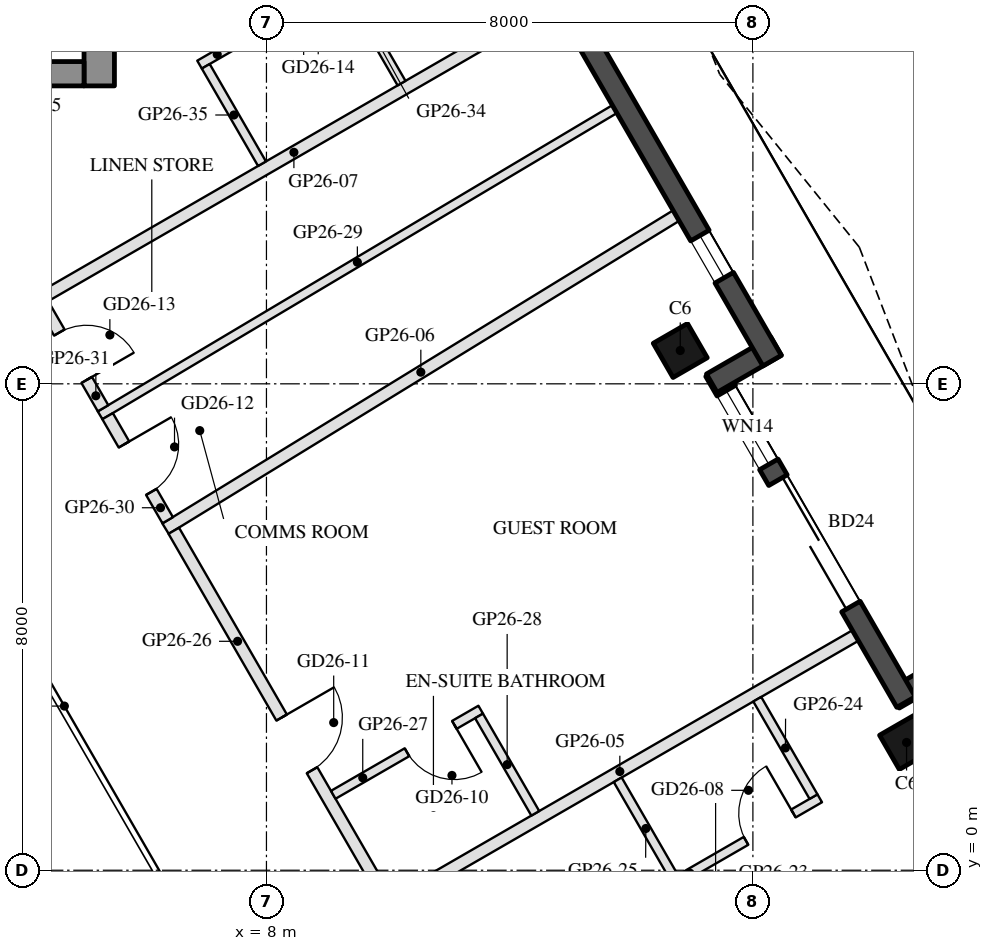
"""IFC4 building model, lengths in metres.
Left out: names, types, materials, properties, quantities, classifications, styles, units other than length and angle.
Written with IfcOpenShell. Run it as: python <this file> out.ifc"""

import sys

from ifc_helpers import new_model, si_unit, direction, frame, frame_2d, origin, origin_2d, place, context, subcontext, project, spatial, rectangle, hollow_rectangle, extrude, boolean, halfspace, element, fill, save


model = new_model("IFC4")
c1 = context("Model", 3, precision=1e-05, world=origin(), true_north=direction((0.0, 1.0)))
c2 = subcontext(c1, "Body", "Model", "MODEL_VIEW")
j1 = project(units=[si_unit("LENGTHUNIT", "METRE"), si_unit("PLANEANGLEUNIT", "RADIAN")], contexts=[c1])
p1 = place(None, origin())
s1 = spatial("IfcSite", under=j1, at=p1, CompositionType="ELEMENT")
p2 = place(p1, origin())
s2 = spatial("IfcBuilding", under=s1, at=p2, CompositionType="ELEMENT")
p3 = place(p2, frame((0.0, 0.0, 272.6)))
s3 = spatial("IfcBuildingStorey", under=s2, at=p3, CompositionType="ELEMENT", Elevation=272.6)
p4 = place(p3, frame((18.527, 2.102, 0.0), z_axis=(0.0, 0.0, 1.0), x_axis=(-0.5, 0.866025403784, 0.0)))
e1 = element("IfcColumn", 1, at=p4, inside=s3, PredefinedType="COLUMN", context=c2, shape_type="SweptSolid", body=[
    boolean("DIFFERENCE", extrude(hollow_rectangle(XDim=0.65, YDim=0.65, WallThickness=0.03, at=origin_2d()), origin(), (0.0, 0.0, 1.0), 3.7), halfspace(frame((0.0, 0.0, 3.66), z_axis=(0.0, 0.0, 1.0), x_axis=(1.0, 0.0, 0.0)), False)),
])
p5 = place(p3, frame((14.805, 8.548, 0.0), z_axis=(0.0, 0.0, 1.0), x_axis=(-0.5, 0.866025403784, 0.0)))
e2 = element("IfcColumn", 2, at=p5, inside=s3, PredefinedType="COLUMN", context=c2, shape_type="SweptSolid", body=[
    boolean("DIFFERENCE", extrude(hollow_rectangle(XDim=0.65, YDim=0.65, WallThickness=0.03, at=origin_2d()), origin(), (0.0, 0.0, 1.0), 3.7), halfspace(frame((0.0, 0.0, 3.663), z_axis=(0.0, 0.0, 1.0), x_axis=(1.0, 0.0, 0.0)), False)),
])
p6 = place(p3, frame((19.377, 3.429, 0.0), z_axis=(0.0, 0.0, 1.0), x_axis=(-0.866092288191, -0.499884134912, 0.0)))
e3 = element("IfcWall", 3, at=p6, inside=s3, PredefinedType="SOLIDWALL", context=c2, shape_type="SweptSolid", body=[
    extrude(rectangle(XDim=1.22, YDim=0.35, at=frame_2d((0.61, 0.0))), origin(), (0.0, 0.0, 1.0), 3.55),
])
p7 = place(p3, frame((18.519, 2.766, 0.0), z_axis=(0.0, 0.0, 1.0), x_axis=(-0.499995993298, 0.866027717042, 0.0)))
e4 = element("IfcWall", 4, at=p7, inside=s3, PredefinedType="SOLIDWALL", context=c2, shape_type="SweptSolid", body=[
    extrude(rectangle(XDim=6.284, YDim=0.35, at=frame_2d((3.142, 0.0))), origin(), (0.0, 0.0, 1.0), 3.55),
])
p8 = place(p7, frame((1.813, 0.0, 0.0)))
e5 = element("IfcOpeningElement", 5, at=p8, cuts=e4, PredefinedType="OPENING", context=c2, shape_type="SweptSolid", body=[
    extrude(rectangle(XDim=2.4, YDim=2.4, at=frame_2d((1.2, 1.2))), frame((0.0, 0.185, 0.0), z_axis=(0.0, -1.0, 0.0), x_axis=(1.0, 0.0, 0.0)), (0.0, 0.0, 1.0), 0.37),
])
p9 = place(p7, frame((4.513, 0.0, 0.3)))
e6 = element("IfcOpeningElement", 6, at=p9, cuts=e4, PredefinedType="OPENING", context=c2, shape_type="SweptSolid", body=[
    extrude(rectangle(XDim=1.4, YDim=2.65, at=frame_2d((0.7, 1.325))), frame((0.0, 0.185, 0.0), z_axis=(0.0, -1.0, 0.0), x_axis=(1.0, 0.0, 0.0)), (0.0, 0.0, 1.0), 0.37),
])
p10 = place(p3, frame((15.324, 8.01, 0.0), z_axis=(0.0, 0.0, 1.0), x_axis=(0.866005645448, 0.500034220881, 0.0)))
e7 = element("IfcWall", 7, at=p10, inside=s3, PredefinedType="SOLIDWALL", context=c2, shape_type="SweptSolid", body=[
    extrude(rectangle(XDim=1.22, YDim=0.35, at=frame_2d((0.61, 0.0))), origin(), (0.0, 0.0, 1.0), 3.55),
])
p11 = place(p3, frame((16.316, 8.381, 0.0), z_axis=(0.0, 0.0, 1.0), x_axis=(-0.500005190411, 0.866022407078, 0.0)))
e8 = element("IfcWall", 8, at=p11, inside=s3, PredefinedType="SOLIDWALL", context=c2, shape_type="SweptSolid", body=[
    extrude(rectangle(XDim=9.244, YDim=0.35, at=frame_2d((4.622, 0.0))), origin(), (0.0, 0.0, 1.0), 3.55),
])
p12 = place(p11, frame((1.575, 0.0, 0.3)))
e9 = element("IfcOpeningElement", 9, at=p12, cuts=e8, PredefinedType="OPENING", context=c2, shape_type="SweptSolid", body=[
    extrude(rectangle(XDim=0.8, YDim=2.65, at=frame_2d((0.4, 1.325))), frame((0.0, 0.185, 0.0), z_axis=(0.0, -1.0, 0.0), x_axis=(1.0, 0.0, 0.0)), (0.0, 0.0, 1.0), 0.37),
])
p13 = place(p3, frame((5.25, 12.9, 0.0), z_axis=(0.0, 0.0, 1.0), x_axis=(0.0, 1.0, 0.0)))
e10 = element("IfcWall", 10, at=p13, inside=s3, PredefinedType="SHEAR", context=c2, shape_type="SweptSolid", body=[
    extrude(rectangle(XDim=13.031, YDim=0.5, at=frame_2d((6.516, 0.0))), origin(), (0.0, 0.0, 1.0), 3.5),
])
p14 = place(p3, frame((5.0, 13.1, 0.0), z_axis=(0.0, 0.0, 1.0), x_axis=(-1.0, 0.0, 0.0)))
e11 = element("IfcWall", 11, at=p14, inside=s3, PredefinedType="SHEAR", context=c2, shape_type="SweptSolid", body=[
    extrude(rectangle(XDim=10.0, YDim=0.4, at=frame_2d((5.0, 0.0))), origin(), (0.0, 0.0, 1.0), 3.5),
])
p15 = place(p14, frame((3.55, 0.0, 0.0)))
e12 = element("IfcOpeningElement", 12, at=p15, cuts=e11, PredefinedType="OPENING", context=c2, shape_type="SweptSolid", body=[
    extrude(rectangle(XDim=1.1, YDim=2.1, at=frame_2d((0.55, 1.05))), frame((0.0, 0.21, 0.0), z_axis=(0.0, -1.0, 0.0), x_axis=(1.0, 0.0, 0.0)), (0.0, 0.0, 1.0), 0.42),
])
p16 = place(p14, frame((5.85, 0.0, 0.0)))
e13 = element("IfcOpeningElement", 13, at=p16, cuts=e11, PredefinedType="OPENING", context=c2, shape_type="SweptSolid", body=[
    extrude(rectangle(XDim=1.4, YDim=2.1, at=frame_2d((0.7, 1.05))), frame((0.0, 0.21, 0.0), z_axis=(0.0, -1.0, 0.0), x_axis=(1.0, 0.0, 0.0)), (0.0, 0.0, 1.0), 0.42),
])
p17 = place(p3, frame((17.685, 3.86, 0.0), z_axis=(0.0, 0.0, 1.0), x_axis=(-0.866026066645, -0.499998851889, 0.0)))
e14 = element("IfcWall", 14, at=p17, inside=s3, PredefinedType="PARTITIONING", context=c2, shape_type="SweptSolid", body=[
    extrude(rectangle(XDim=8.946, YDim=0.2, at=frame_2d((4.473, 0.0))), origin(), (0.0, 0.0, 1.0), 3.1),
])
p18 = place(p3, frame((14.737, 10.766, 0.0), z_axis=(0.0, 0.0, 1.0), x_axis=(-0.852501485732, -0.522724800277, 0.0)))
e15 = element("IfcWall", 15, at=p18, inside=s3, PredefinedType="PARTITIONING", context=c2, shape_type="SweptSolid", body=[
    extrude(rectangle(XDim=9.849, YDim=0.2, at=frame_2d((4.925, 0.0))), origin(), (0.0, 0.0, 1.0), 3.1),
])
p19 = place(p3, frame((12.715, 14.269, 0.0), z_axis=(0.0, 0.0, 1.0), x_axis=(-0.866024954444, -0.500000778279, 0.0)))
e16 = element("IfcWall", 16, at=p19, inside=s3, PredefinedType="PARTITIONING", context=c2, shape_type="SweptSolid", body=[
    extrude(rectangle(XDim=9.846, YDim=0.2, at=frame_2d((4.923, 0.0))), origin(), (0.0, 0.0, 1.0), 3.1),
])
p20 = place(p3, frame((14.674, -0.217, 0.0), z_axis=(0.0, 0.0, 1.0), x_axis=(0.866056369097, 0.49994636267, 0.0)))
e17 = element("IfcWall", 17, at=p20, inside=s3, PredefinedType="PARTITIONING", context=c2, shape_type="SweptSolid", body=[
    extrude(rectangle(XDim=2.8, YDim=0.15, at=frame_2d((1.4, 0.0))), origin(), (0.0, 0.0, 1.0), 3.0),
])
p21 = place(p20, frame((1.4, 0.0, 0.0)))
e18 = element("IfcOpeningElement", 18, at=p21, cuts=e17, PredefinedType="OPENING", context=c2, shape_type="SweptSolid", body=[
    extrude(rectangle(XDim=0.9, YDim=2.1, at=frame_2d((0.45, 1.05))), frame((0.0, 0.085, 0.0), z_axis=(0.0, -1.0, 0.0), x_axis=(1.0, 0.0, 0.0)), (0.0, 0.0, 1.0), 0.17),
])
p22 = place(p3, frame((16.997, 1.211, 0.0), z_axis=(0.0, 0.0, 1.0), x_axis=(-0.500042316284, 0.866000971088, 0.0)))
e19 = element("IfcWall", 19, at=p22, inside=s3, PredefinedType="PARTITIONING", context=c2, shape_type="SweptSolid", body=[
    extrude(rectangle(XDim=1.85, YDim=0.15, at=frame_2d((0.925, 0.0))), origin(), (0.0, 0.0, 1.0), 3.0),
])
p23 = place(p3, frame((14.702, -0.115, 0.0), z_axis=(0.0, 0.0, 1.0), x_axis=(-0.499985172903, 0.866033964044, 0.0)))
e20 = element("IfcWall", 20, at=p23, inside=s3, PredefinedType="PARTITIONING", context=c2, shape_type="SweptSolid", body=[
    extrude(rectangle(XDim=1.85, YDim=0.15, at=frame_2d((0.925, 0.0))), origin(), (0.0, 0.0, 1.0), 3.0),
])
p24 = place(p3, frame((6.476, 5.583, 0.0), z_axis=(0.0, 0.0, 1.0), x_axis=(0.499989243959, -0.866031613699, 0.0)))
e21 = element("IfcWall", 21, at=p24, inside=s3, PredefinedType="PARTITIONING", context=c2, shape_type="SweptSolid", body=[
    extrude(rectangle(XDim=6.997, YDim=0.2, at=frame_2d((3.499, 0.0))), origin(), (0.0, 0.0, 1.0), 3.0),
])
p25 = place(p24, frame((3.547, 0.0, 0.0)))
e22 = element("IfcOpeningElement", 22, at=p25, cuts=e21, PredefinedType="OPENING", context=c2, shape_type="SweptSolid", body=[
    extrude(rectangle(XDim=1.0, YDim=2.1, at=frame_2d((0.5, 1.05))), frame((0.0, 0.11, 0.0), z_axis=(0.0, -1.0, 0.0), x_axis=(1.0, 0.0, 0.0)), (0.0, 0.0, 1.0), 0.22),
])
p26 = place(p3, frame((11.524, 2.641, 0.0), z_axis=(0.0, 0.0, 1.0), x_axis=(-0.866018616679, -0.500011755427, 0.0)))
e23 = element("IfcWall", 23, at=p26, inside=s3, PredefinedType="PARTITIONING", context=c2, shape_type="SweptSolid", body=[
    extrude(rectangle(XDim=2.8, YDim=0.15, at=frame_2d((1.4, 0.0))), origin(), (0.0, 0.0, 1.0), 3.55),
])
p27 = place(p26, frame((0.5, 0.0, 0.0)))
e24 = element("IfcOpeningElement", 24, at=p27, cuts=e23, PredefinedType="OPENING", context=c2, shape_type="SweptSolid", body=[
    extrude(rectangle(XDim=0.9, YDim=2.1, at=frame_2d((0.45, 1.05))), frame((0.0, 0.085, 0.0), z_axis=(0.0, -1.0, 0.0), x_axis=(1.0, 0.0, 0.0)), (0.0, 0.0, 1.0), 0.17),
])
p28 = place(p3, frame((12.421, 0.936, 0.0), z_axis=(0.0, 0.0, 1.0), x_axis=(-0.500042316284, 0.866000971088, 0.0)))
e25 = element("IfcWall", 25, at=p28, inside=s3, PredefinedType="PARTITIONING", context=c2, shape_type="SweptSolid", body=[
    extrude(rectangle(XDim=1.85, YDim=0.15, at=frame_2d((0.925, 0.0))), origin(), (0.0, 0.0, 1.0), 3.0),
])
p29 = place(p3, frame((13.726, 12.518, 0.0), z_axis=(0.0, 0.0, 1.0), x_axis=(-0.859340362174, -0.511404088699, 0.0)))
e26 = element("IfcWall", 26, at=p29, inside=s3, PredefinedType="PARTITIONING", context=c2, shape_type="SweptSolid", body=[
    extrude(rectangle(XDim=9.847, YDim=0.15, at=frame_2d((4.923, 0.0))), origin(), (0.0, 0.0, 1.0), 3.0),
])
p30 = place(p3, frame((5.388, 7.468, 0.0), z_axis=(0.0, 0.0, 1.0), x_axis=(0.500071767444, -0.865983964866, 0.0)))
e27 = element("IfcWall", 27, at=p30, inside=s3, PredefinedType="PARTITIONING", context=c2, shape_type="SweptSolid", body=[
    extrude(rectangle(XDim=1.976, YDim=0.2, at=frame_2d((0.988, 0.0))), origin(), (0.0, 0.0, 1.0), 3.0),
])
p31 = place(p30, frame((0.538, 0.0, 0.0)))
e28 = element("IfcOpeningElement", 28, at=p31, cuts=e27, PredefinedType="OPENING", context=c2, shape_type="SweptSolid", body=[
    extrude(rectangle(XDim=0.9, YDim=2.1, at=frame_2d((0.45, 1.05))), frame((0.0, 0.11, 0.0), z_axis=(0.0, -1.0, 0.0), x_axis=(1.0, 0.0, 0.0)), (0.0, 0.0, 1.0), 0.22),
])
p32 = place(p3, frame((4.325, 9.31, 0.0), z_axis=(0.0, 0.0, 1.0), x_axis=(0.499925626596, -0.866068339032, 0.0)))
e29 = element("IfcWall", 29, at=p32, inside=s3, PredefinedType="PARTITIONING", context=c2, shape_type="SweptSolid", body=[
    extrude(rectangle(XDim=1.976, YDim=0.2, at=frame_2d((0.988, 0.0))), origin(), (0.0, 0.0, 1.0), 3.55),
])
p33 = place(p32, frame((0.538, 0.0, 0.0)))
e30 = element("IfcOpeningElement", 30, at=p33, cuts=e29, PredefinedType="OPENING", context=c2, shape_type="SweptSolid", body=[
    extrude(rectangle(XDim=0.9, YDim=2.1, at=frame_2d((0.45, 1.05))), frame((0.0, 0.11, 0.0), z_axis=(0.0, -1.0, 0.0), x_axis=(1.0, 0.0, 0.0)), (0.0, 0.0, 1.0), 0.22),
])
p34 = place(p3, frame((9.324, 14.65, 0.0), z_axis=(0.0, 0.0, 1.0), x_axis=(-0.866034573852, -0.49998411664, 0.0)))
e31 = element("IfcWall", 31, at=p34, inside=s3, PredefinedType="PARTITIONING", context=c2, shape_type="SweptSolid", body=[
    extrude(rectangle(XDim=2.8, YDim=0.15, at=frame_2d((1.4, 0.0))), origin(), (0.0, 0.0, 1.0), 3.55),
])
p35 = place(p34, frame((0.5, 0.0, 0.0)))
e32 = element("IfcOpeningElement", 32, at=p35, cuts=e31, PredefinedType="OPENING", context=c2, shape_type="SweptSolid", body=[
    extrude(rectangle(XDim=0.9, YDim=2.1, at=frame_2d((0.45, 1.05))), frame((0.0, 0.085, 0.0), z_axis=(0.0, -1.0, 0.0), x_axis=(1.0, 0.0, 0.0)), (0.0, 0.0, 1.0), 0.17),
])
for number, where, z_axis, x_axis in (
    (33, (10.222, 12.945, 0.0), (0.0, 0.0, 1.0), (-0.5, 0.866, 0.0)),
    (34, (7.927, 11.62, 0.0), (0.0, 0.0, 1.0), (-0.5, 0.866, 0.0)),
):
    element("IfcWall", number, at=place(p3, frame(where, z_axis=z_axis, x_axis=x_axis)), inside=s3, PredefinedType="PARTITIONING", context=c2, shape_type="SweptSolid", body=[
        extrude(rectangle(XDim=1.85, YDim=0.15, at=frame_2d((0.925, 0.0))), origin(), (0.0, 0.0, 1.0), 3.0),
    ])
p36 = place(p8, frame((2.4, 0.0, 0.0), z_axis=(0.0, 0.0, 1.0), x_axis=(-1.0, 0.0, 0.0)))
e35 = element("IfcDoor", 35, at=p36, inside=s3, OperationType="SLIDING_TO_LEFT", PredefinedType="DOOR", context=c2, shape_type="SweptSolid", body=[
    extrude(rectangle(XDim=2.4, YDim=2.4, at=frame_2d((1.2, 1.2))), frame((0.0, 0.025, 0.0), z_axis=(0.0, -1.0, 0.0), x_axis=(1.0, 0.0, 0.0)), (0.0, 0.0, 1.0), 0.05),
])
fill(e5, e35)
p37 = place(p9, origin())
e36 = element("IfcWindow", 36, at=p37, inside=s3, PartitioningType="SINGLE_PANEL", PredefinedType="WINDOW", context=c2, shape_type="SweptSolid", body=[
    extrude(rectangle(XDim=1.4, YDim=2.65, at=frame_2d((0.7, 1.325))), frame((0.0, 0.03, 0.0), z_axis=(0.0, -1.0, 0.0), x_axis=(1.0, 0.0, 0.0)), (0.0, 0.0, 1.0), 0.06),
])
fill(e6, e36)
p38 = place(p12, origin())
e37 = element("IfcWindow", 37, at=p38, inside=s3, PartitioningType="SINGLE_PANEL", PredefinedType="WINDOW", context=c2, shape_type="SweptSolid", body=[
    extrude(rectangle(XDim=0.8, YDim=2.65, at=frame_2d((0.4, 1.325))), frame((0.0, 0.03, 0.0), z_axis=(0.0, -1.0, 0.0), x_axis=(1.0, 0.0, 0.0)), (0.0, 0.0, 1.0), 0.06),
])
fill(e9, e37)
p39 = place(p21, origin())
e38 = element("IfcDoor", 38, at=p39, inside=s3, OperationType="SINGLE_SWING_RIGHT", PredefinedType="DOOR", context=c2, shape_type="SweptSolid", body=[
    extrude(rectangle(XDim=0.9, YDim=2.1, at=frame_2d((0.45, 1.05))), frame((0.0, 0.025, 0.0), z_axis=(0.0, -1.0, 0.0), x_axis=(1.0, 0.0, 0.0)), (0.0, 0.0, 1.0), 0.05),
])
fill(e18, e38)
p40 = place(p27, origin())
e39 = element("IfcDoor", 39, at=p40, inside=s3, OperationType="SINGLE_SWING_LEFT", PredefinedType="DOOR", context=c2, shape_type="SweptSolid", body=[
    extrude(rectangle(XDim=0.9, YDim=2.1, at=frame_2d((0.45, 1.05))), frame((0.0, 0.025, 0.0), z_axis=(0.0, -1.0, 0.0), x_axis=(1.0, 0.0, 0.0)), (0.0, 0.0, 1.0), 0.05),
])
fill(e24, e39)
p41 = place(p25, origin())
e40 = element("IfcDoor", 40, at=p41, inside=s3, OperationType="SINGLE_SWING_LEFT", PredefinedType="DOOR", context=c2, shape_type="SweptSolid", body=[
    extrude(rectangle(XDim=1.0, YDim=2.1, at=frame_2d((0.5, 1.05))), frame((0.0, 0.025, 0.0), z_axis=(0.0, -1.0, 0.0), x_axis=(1.0, 0.0, 0.0)), (0.0, 0.0, 1.0), 0.05),
])
fill(e22, e40)
p42 = place(p31, origin())
e41 = element("IfcDoor", 41, at=p42, inside=s3, OperationType="SINGLE_SWING_LEFT", PredefinedType="DOOR", context=c2, shape_type="SweptSolid", body=[
    extrude(rectangle(XDim=0.9, YDim=2.1, at=frame_2d((0.45, 1.05))), frame((0.0, 0.025, 0.0), z_axis=(0.0, -1.0, 0.0), x_axis=(1.0, 0.0, 0.0)), (0.0, 0.0, 1.0), 0.05),
])
fill(e28, e41)
p43 = place(p33, origin())
e42 = element("IfcDoor", 42, at=p43, inside=s3, OperationType="SINGLE_SWING_RIGHT", PredefinedType="DOOR", context=c2, shape_type="SweptSolid", body=[
    extrude(rectangle(XDim=0.9, YDim=2.1, at=frame_2d((0.45, 1.05))), frame((0.0, 0.025, 0.0), z_axis=(0.0, -1.0, 0.0), x_axis=(1.0, 0.0, 0.0)), (0.0, 0.0, 1.0), 0.05),
])
fill(e30, e42)
save(model, sys.argv[1])
